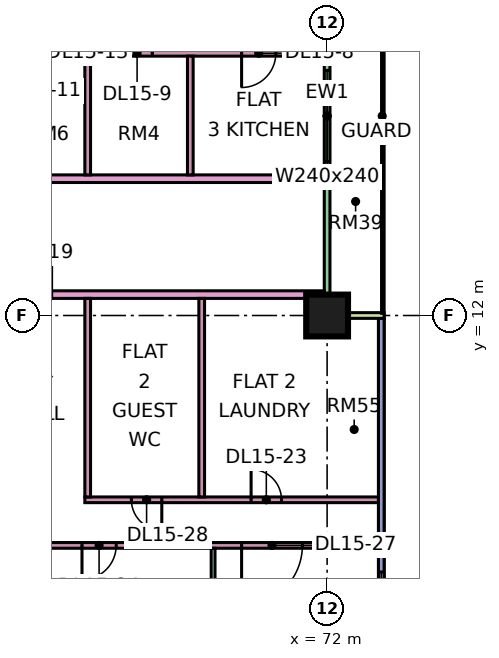
"""IFC4 building model, lengths in metres.
Left out: names, types, materials, properties, quantities, classifications, styles, units other than length and angle.
Written with IfcOpenShell. Run it as: python <this file> out.ifc"""

import sys

from ifc_helpers import new_model, si_unit, direction, frame, frame_2d, origin, origin_2d, place, context, subcontext, project, spatial, rectangle, extrude, element, fill, save


model = new_model("IFC4")
c1 = context("Model", 3, precision=1e-05, world=origin(), true_north=direction((0.0, 1.0)))
c2 = subcontext(c1, "Body", "Model", "MODEL_VIEW")
j1 = project(units=[si_unit("LENGTHUNIT", "METRE"), si_unit("PLANEANGLEUNIT", "RADIAN")], contexts=[c1])
p1 = place(None, origin())
s1 = spatial("IfcSite", under=j1, at=p1, CompositionType="ELEMENT")
p2 = place(p1, origin())
s2 = spatial("IfcBuilding", under=s1, at=p2, CompositionType="ELEMENT")
p3 = place(p2, frame((0.0, 0.0, 71.4)))
s3 = spatial("IfcBuildingStorey", under=s2, at=p3, CompositionType="ELEMENT", Elevation=71.4)
p4 = place(p3, frame((72.0, 12.0, 0.0), z_axis=(0.0, 0.0, 1.0), x_axis=(1.0, 0.0, 0.0)))
e1 = element("IfcColumn", 1, at=p4, inside=s3, PredefinedType="COLUMN", context=c2, shape_type="SweptSolid", body=[
    extrude(rectangle(XDim=1.1, YDim=1.1, at=origin_2d()), origin(), (0.0, 0.0, 1.0), 3.75),
])
p5 = place(p3, frame((73.425, 1.5, 0.0), z_axis=(0.0, 0.0, 1.0), x_axis=(0.0, 1.0, 0.0)))
e2 = element("IfcWall", 2, at=p5, inside=s3, PredefinedType="SOLIDWALL", context=c2, shape_type="SweptSolid", body=[
    extrude(rectangle(XDim=10.425, YDim=0.15, at=frame_2d((5.212, 0.0))), origin(), (0.0, 0.0, 1.0), 3.35),
])
p6 = place(p5, frame((0.75, 0.0, 0.45)))
e3 = element("IfcOpeningElement", 3, at=p6, cuts=e2, PredefinedType="OPENING", context=c2, shape_type="SweptSolid", body=[
    extrude(rectangle(XDim=3.0, YDim=2.4, at=frame_2d((1.5, 1.2))), frame((0.0, 0.085, 0.0), z_axis=(0.0, -1.0, 0.0), x_axis=(1.0, 0.0, 0.0)), (0.0, 0.0, 1.0), 0.17),
])
p7 = place(p3, frame((72.0, 12.075, 0.0), z_axis=(0.0, 0.0, 1.0), x_axis=(0.0, 1.0, 0.0)))
e4 = element("IfcWall", 4, at=p7, inside=s3, PredefinedType="SOLIDWALL", context=c2, shape_type="SweptSolid", body=[
    extrude(rectangle(XDim=10.35, YDim=0.15, at=frame_2d((5.175, 0.0))), origin(), (0.0, 0.0, 1.0), 3.35),
])
p8 = place(p7, frame((3.975, 0.0, 0.45)))
e5 = element("IfcOpeningElement", 5, at=p8, cuts=e4, PredefinedType="OPENING", context=c2, shape_type="SweptSolid", body=[
    extrude(rectangle(XDim=2.4, YDim=2.4, at=frame_2d((1.2, 1.2))), frame((0.0, 0.085, 0.0), z_axis=(0.0, -1.0, 0.0), x_axis=(1.0, 0.0, 0.0)), (0.0, 0.0, 1.0), 0.17),
])
p9 = place(p7, frame((8.587, 0.0, 0.45)))
e6 = element("IfcOpeningElement", 6, at=p9, cuts=e4, PredefinedType="OPENING", context=c2, shape_type="SweptSolid", body=[
    extrude(rectangle(XDim=1.2, YDim=2.4, at=frame_2d((0.6, 1.2))), frame((0.0, 0.085, 0.0), z_axis=(0.0, -1.0, 0.0), x_axis=(1.0, 0.0, 0.0)), (0.0, 0.0, 1.0), 0.17),
])
p10 = place(p3, frame((73.5, 12.0, 0.0), z_axis=(0.0, 0.0, 1.0), x_axis=(-1.0, 0.0, 0.0)))
e7 = element("IfcWall", 7, at=p10, inside=s3, PredefinedType="SOLIDWALL", context=c2, shape_type="SweptSolid", body=[
    extrude(rectangle(XDim=1.5, YDim=0.15, at=frame_2d((0.75, 0.0))), origin(), (0.0, 0.0, 1.0), 3.35),
])
p11 = place(p3, frame((40.65, 12.55, 0.0), z_axis=(0.0, 0.0, 1.0), x_axis=(1.0, 0.0, 0.0)))
e8 = element("IfcWall", 8, at=p11, inside=s3, PredefinedType="PARTITIONING", context=c2, shape_type="SweptSolid", body=[
    extrude(rectangle(XDim=31.276, YDim=0.2, at=frame_2d((15.638, 0.0))), origin(), (0.0, 0.0, 1.0), 3.35),
])
p12 = place(p11, frame((23.1, 0.0, 0.0)))
e9 = element("IfcOpeningElement", 9, at=p12, cuts=e8, PredefinedType="OPENING", context=c2, shape_type="SweptSolid", body=[
    extrude(rectangle(XDim=1.0, YDim=2.1, at=frame_2d((0.5, 1.05))), frame((0.0, 0.11, 0.0), z_axis=(0.0, -1.0, 0.0), x_axis=(1.0, 0.0, 0.0)), (0.0, 0.0, 1.0), 0.22),
])
p13 = place(p11, frame((1.05, 0.0, 0.0)))
e10 = element("IfcOpeningElement", 10, at=p13, cuts=e8, PredefinedType="OPENING", context=c2, shape_type="SweptSolid", body=[
    extrude(rectangle(XDim=1.0, YDim=2.1, at=frame_2d((0.5, 1.05))), frame((0.0, 0.11, 0.0), z_axis=(0.0, -1.0, 0.0), x_axis=(1.0, 0.0, 0.0)), (0.0, 0.0, 1.0), 0.22),
])
p14 = place(p3, frame((48.1, 5.95, 0.0), z_axis=(0.0, 0.0, 1.0), x_axis=(1.0, 0.0, 0.0)))
e11 = element("IfcWall", 11, at=p14, inside=s3, PredefinedType="PARTITIONING", context=c2, shape_type="SweptSolid", body=[
    extrude(rectangle(XDim=25.25, YDim=0.15, at=frame_2d((12.625, 0.0))), origin(), (0.0, 0.0, 1.0), 3.35),
])
p15 = place(p14, frame((0.95, 0.0, 0.0)))
e12 = element("IfcOpeningElement", 12, at=p15, cuts=e11, PredefinedType="OPENING", context=c2, shape_type="SweptSolid", body=[
    extrude(rectangle(XDim=0.9, YDim=2.1, at=frame_2d((0.45, 1.05))), frame((0.0, 0.085, 0.0), z_axis=(0.0, -1.0, 0.0), x_axis=(1.0, 0.0, 0.0)), (0.0, 0.0, 1.0), 0.17),
])
p16 = place(p14, frame((3.95, 0.0, 0.0)))
e13 = element("IfcOpeningElement", 13, at=p16, cuts=e11, PredefinedType="OPENING", context=c2, shape_type="SweptSolid", body=[
    extrude(rectangle(XDim=0.9, YDim=2.1, at=frame_2d((0.45, 1.05))), frame((0.0, 0.085, 0.0), z_axis=(0.0, -1.0, 0.0), x_axis=(1.0, 0.0, 0.0)), (0.0, 0.0, 1.0), 0.17),
])
p17 = place(p14, frame((6.95, 0.0, 0.0)))
e14 = element("IfcOpeningElement", 14, at=p17, cuts=e11, PredefinedType="OPENING", context=c2, shape_type="SweptSolid", body=[
    extrude(rectangle(XDim=0.9, YDim=2.1, at=frame_2d((0.45, 1.05))), frame((0.0, 0.085, 0.0), z_axis=(0.0, -1.0, 0.0), x_axis=(1.0, 0.0, 0.0)), (0.0, 0.0, 1.0), 0.17),
])
p18 = place(p14, frame((9.95, 0.0, 0.0)))
e15 = element("IfcOpeningElement", 15, at=p18, cuts=e11, PredefinedType="OPENING", context=c2, shape_type="SweptSolid", body=[
    extrude(rectangle(XDim=0.9, YDim=2.1, at=frame_2d((0.45, 1.05))), frame((0.0, 0.085, 0.0), z_axis=(0.0, -1.0, 0.0), x_axis=(1.0, 0.0, 0.0)), (0.0, 0.0, 1.0), 0.17),
])
p19 = place(p14, frame((17.45, 0.0, 0.0)))
e16 = element("IfcOpeningElement", 16, at=p19, cuts=e11, PredefinedType="OPENING", context=c2, shape_type="SweptSolid", body=[
    extrude(rectangle(XDim=0.9, YDim=2.1, at=frame_2d((0.45, 1.05))), frame((0.0, 0.085, 0.0), z_axis=(0.0, -1.0, 0.0), x_axis=(1.0, 0.0, 0.0)), (0.0, 0.0, 1.0), 0.17),
])
p20 = place(p14, frame((13.8, 0.0, 0.0)))
e17 = element("IfcOpeningElement", 17, at=p20, cuts=e11, PredefinedType="OPENING", context=c2, shape_type="SweptSolid", body=[
    extrude(rectangle(XDim=0.8, YDim=2.1, at=frame_2d((0.4, 1.05))), frame((0.0, 0.085, 0.0), z_axis=(0.0, -1.0, 0.0), x_axis=(1.0, 0.0, 0.0)), (0.0, 0.0, 1.0), 0.17),
])
p21 = place(p14, frame((21.65, 0.0, 0.0)))
e18 = element("IfcOpeningElement", 18, at=p21, cuts=e11, PredefinedType="OPENING", context=c2, shape_type="SweptSolid", body=[
    extrude(rectangle(XDim=1.6, YDim=2.1, at=frame_2d((0.8, 1.05))), frame((0.0, 0.085, 0.0), z_axis=(0.0, -1.0, 0.0), x_axis=(1.0, 0.0, 0.0)), (0.0, 0.0, 1.0), 0.17),
])
p22 = place(p3, frame((51.225, 15.6, 0.0), z_axis=(0.0, 0.0, 1.0), x_axis=(1.0, 0.0, 0.0)))
e19 = element("IfcWall", 19, at=p22, inside=s3, PredefinedType="PARTITIONING", context=c2, shape_type="SweptSolid", body=[
    extrude(rectangle(XDim=20.701, YDim=0.2, at=frame_2d((10.351, 0.0))), origin(), (0.0, 0.0, 1.0), 3.35),
])
p23 = place(p22, frame((3.725, 0.0, 0.0)))
e20 = element("IfcOpeningElement", 20, at=p23, cuts=e19, PredefinedType="OPENING", context=c2, shape_type="SweptSolid", body=[
    extrude(rectangle(XDim=1.0, YDim=2.1, at=frame_2d((0.5, 1.05))), frame((0.0, 0.11, 0.0), z_axis=(0.0, -1.0, 0.0), x_axis=(1.0, 0.0, 0.0)), (0.0, 0.0, 1.0), 0.22),
])
p24 = place(p22, frame((0.875, 0.0, 0.0)))
e21 = element("IfcOpeningElement", 21, at=p24, cuts=e19, PredefinedType="OPENING", context=c2, shape_type="SweptSolid", body=[
    extrude(rectangle(XDim=1.0, YDim=2.1, at=frame_2d((0.5, 1.05))), frame((0.0, 0.11, 0.0), z_axis=(0.0, -1.0, 0.0), x_axis=(1.0, 0.0, 0.0)), (0.0, 0.0, 1.0), 0.22),
])
p25 = place(p3, frame((56.925, 18.9, 0.0), z_axis=(0.0, 0.0, 1.0), x_axis=(1.0, 0.0, 0.0)))
e22 = element("IfcWall", 22, at=p25, inside=s3, PredefinedType="PARTITIONING", context=c2, shape_type="SweptSolid", body=[
    extrude(rectangle(XDim=15.001, YDim=0.15, at=frame_2d((7.5, 0.0))), origin(), (0.0, 0.0, 1.0), 3.35),
])
p26 = place(p25, frame((4.125, 0.0, 0.0)))
e23 = element("IfcOpeningElement", 23, at=p26, cuts=e22, PredefinedType="OPENING", context=c2, shape_type="SweptSolid", body=[
    extrude(rectangle(XDim=0.8, YDim=2.1, at=frame_2d((0.4, 1.05))), frame((0.0, 0.085, 0.0), z_axis=(0.0, -1.0, 0.0), x_axis=(1.0, 0.0, 0.0)), (0.0, 0.0, 1.0), 0.17),
])
p27 = place(p25, frame((12.825, 0.0, 0.0)))
e24 = element("IfcOpeningElement", 24, at=p27, cuts=e22, PredefinedType="OPENING", context=c2, shape_type="SweptSolid", body=[
    extrude(rectangle(XDim=0.9, YDim=2.1, at=frame_2d((0.45, 1.05))), frame((0.0, 0.085, 0.0), z_axis=(0.0, -1.0, 0.0), x_axis=(1.0, 0.0, 0.0)), (0.0, 0.0, 1.0), 0.17),
])
p28 = place(p25, frame((9.675, 0.0, 0.0)))
e25 = element("IfcOpeningElement", 25, at=p28, cuts=e22, PredefinedType="OPENING", context=c2, shape_type="SweptSolid", body=[
    extrude(rectangle(XDim=0.8, YDim=2.1, at=frame_2d((0.4, 1.05))), frame((0.0, 0.085, 0.0), z_axis=(0.0, -1.0, 0.0), x_axis=(1.0, 0.0, 0.0)), (0.0, 0.0, 1.0), 0.17),
])
p29 = place(p25, frame((0.825, 0.0, 0.0)))
e26 = element("IfcOpeningElement", 26, at=p29, cuts=e22, PredefinedType="OPENING", context=c2, shape_type="SweptSolid", body=[
    extrude(rectangle(XDim=0.8, YDim=2.1, at=frame_2d((0.4, 1.05))), frame((0.0, 0.085, 0.0), z_axis=(0.0, -1.0, 0.0), x_axis=(1.0, 0.0, 0.0)), (0.0, 0.0, 1.0), 0.17),
])
p30 = place(p25, frame((7.275, 0.0, 0.0)))
e27 = element("IfcOpeningElement", 27, at=p30, cuts=e22, PredefinedType="OPENING", context=c2, shape_type="SweptSolid", body=[
    extrude(rectangle(XDim=0.8, YDim=2.1, at=frame_2d((0.4, 1.05))), frame((0.0, 0.085, 0.0), z_axis=(0.0, -1.0, 0.0), x_axis=(1.0, 0.0, 0.0)), (0.0, 0.0, 1.0), 0.17),
])
p31 = place(p3, frame((65.625, 7.15, 0.0), z_axis=(0.0, 0.0, 1.0), x_axis=(1.0, 0.0, 0.0)))
e28 = element("IfcWall", 28, at=p31, inside=s3, PredefinedType="PARTITIONING", context=c2, shape_type="SweptSolid", body=[
    extrude(rectangle(XDim=7.725, YDim=0.15, at=frame_2d((3.863, 0.0))), origin(), (0.0, 0.0, 1.0), 3.35),
])
p32 = place(p31, frame((4.375, 0.0, 0.0)))
e29 = element("IfcOpeningElement", 29, at=p32, cuts=e28, PredefinedType="OPENING", context=c2, shape_type="SweptSolid", body=[
    extrude(rectangle(XDim=0.8, YDim=2.1, at=frame_2d((0.4, 1.05))), frame((0.0, 0.085, 0.0), z_axis=(0.0, -1.0, 0.0), x_axis=(1.0, 0.0, 0.0)), (0.0, 0.0, 1.0), 0.17),
])
p33 = place(p31, frame((1.225, 0.0, 0.0)))
e30 = element("IfcOpeningElement", 30, at=p33, cuts=e28, PredefinedType="OPENING", context=c2, shape_type="SweptSolid", body=[
    extrude(rectangle(XDim=0.8, YDim=2.1, at=frame_2d((0.4, 1.05))), frame((0.0, 0.085, 0.0), z_axis=(0.0, -1.0, 0.0), x_axis=(1.0, 0.0, 0.0)), (0.0, 0.0, 1.0), 0.17),
])
p34 = place(p3, frame((65.7, 7.225, 0.0), z_axis=(0.0, 0.0, 1.0), x_axis=(0.0, 1.0, 0.0)))
e31 = element("IfcWall", 31, at=p34, inside=s3, PredefinedType="PARTITIONING", context=c2, shape_type="SweptSolid", body=[
    extrude(rectangle(XDim=5.225, YDim=0.15, at=frame_2d((2.612, 0.0))), origin(), (0.0, 0.0, 1.0), 3.35),
])
for number, where, z_axis, x_axis in (
    (32, (65.7, 15.7, 0.0), (0.0, 0.0, 1.0), (0.0, 1.0, 0.0)),
    (33, (68.4, 15.7, 0.0), (0.0, 0.0, 1.0), (0.0, 1.0, 0.0)),
):
    element("IfcWall", number, at=place(p3, frame(where, z_axis=z_axis, x_axis=x_axis)), inside=s3, PredefinedType="PARTITIONING", context=c2, shape_type="SweptSolid", body=[
        extrude(rectangle(XDim=3.125, YDim=0.15, at=frame_2d((1.562, 0.0))), origin(), (0.0, 0.0, 1.0), 3.35),
    ])
p35 = place(p3, frame((68.7, 7.225, 0.0), z_axis=(0.0, 0.0, 1.0), x_axis=(0.0, 1.0, 0.0)))
e34 = element("IfcWall", 34, at=p35, inside=s3, PredefinedType="PARTITIONING", context=c2, shape_type="SweptSolid", body=[
    extrude(rectangle(XDim=5.225, YDim=0.15, at=frame_2d((2.612, 0.0))), origin(), (0.0, 0.0, 1.0), 3.35),
])
p36 = place(p3, frame((69.0, 0.074, 0.0), z_axis=(0.0, 0.0, 1.0), x_axis=(0.0, 1.0, 0.0)))
e35 = element("IfcWall", 35, at=p36, inside=s3, PredefinedType="PARTITIONING", context=c2, shape_type="SweptSolid", body=[
    extrude(rectangle(XDim=5.801, YDim=0.1, at=frame_2d((2.9, 0.0))), origin(), (0.0, 0.0, 1.0), 3.35),
])
p37 = place(p6, origin())
e36 = element("IfcWindow", 36, at=p37, inside=s3, PartitioningType="SINGLE_PANEL", PredefinedType="WINDOW", context=c2, shape_type="SweptSolid", body=[
    extrude(rectangle(XDim=3.0, YDim=2.4, at=frame_2d((1.5, 1.2))), frame((0.0, 0.03, 0.0), z_axis=(0.0, -1.0, 0.0), x_axis=(1.0, 0.0, 0.0)), (0.0, 0.0, 1.0), 0.06),
])
fill(e3, e36)
p38 = place(p8, origin())
e37 = element("IfcWindow", 37, at=p38, inside=s3, PartitioningType="SINGLE_PANEL", PredefinedType="WINDOW", context=c2, shape_type="SweptSolid", body=[
    extrude(rectangle(XDim=2.4, YDim=2.4, at=frame_2d((1.2, 1.2))), frame((0.0, 0.03, 0.0), z_axis=(0.0, -1.0, 0.0), x_axis=(1.0, 0.0, 0.0)), (0.0, 0.0, 1.0), 0.06),
])
fill(e5, e37)
p39 = place(p27, frame((0.9, 0.0, 0.0), z_axis=(0.0, 0.0, 1.0), x_axis=(-1.0, 0.0, 0.0)))
e38 = element("IfcDoor", 38, at=p39, inside=s3, OperationType="SINGLE_SWING_LEFT", PredefinedType="DOOR", context=c2, shape_type="SweptSolid", body=[
    extrude(rectangle(XDim=0.9, YDim=2.1, at=frame_2d((0.45, 1.05))), frame((0.0, 0.025, 0.0), z_axis=(0.0, -1.0, 0.0), x_axis=(1.0, 0.0, 0.0)), (0.0, 0.0, 1.0), 0.05),
])
fill(e24, e38)
p40 = place(p28, frame((0.8, 0.0, 0.0), z_axis=(0.0, 0.0, 1.0), x_axis=(-1.0, 0.0, 0.0)))
e39 = element("IfcDoor", 39, at=p40, inside=s3, OperationType="SINGLE_SWING_RIGHT", PredefinedType="DOOR", context=c2, shape_type="SweptSolid", body=[
    extrude(rectangle(XDim=0.8, YDim=2.1, at=frame_2d((0.4, 1.05))), frame((0.0, 0.025, 0.0), z_axis=(0.0, -1.0, 0.0), x_axis=(1.0, 0.0, 0.0)), (0.0, 0.0, 1.0), 0.05),
])
fill(e25, e39)
p41 = place(p30, frame((0.8, 0.0, 0.0), z_axis=(0.0, 0.0, 1.0), x_axis=(-1.0, 0.0, 0.0)))
e40 = element("IfcDoor", 40, at=p41, inside=s3, OperationType="SINGLE_SWING_RIGHT", PredefinedType="DOOR", context=c2, shape_type="SweptSolid", body=[
    extrude(rectangle(XDim=0.8, YDim=2.1, at=frame_2d((0.4, 1.05))), frame((0.0, 0.025, 0.0), z_axis=(0.0, -1.0, 0.0), x_axis=(1.0, 0.0, 0.0)), (0.0, 0.0, 1.0), 0.05),
])
fill(e27, e40)
p42 = place(p32, origin())
e41 = element("IfcDoor", 41, at=p42, inside=s3, OperationType="SINGLE_SWING_LEFT", PredefinedType="DOOR", context=c2, shape_type="SweptSolid", body=[
    extrude(rectangle(XDim=0.8, YDim=2.1, at=frame_2d((0.4, 1.05))), frame((0.0, 0.025, 0.0), z_axis=(0.0, -1.0, 0.0), x_axis=(1.0, 0.0, 0.0)), (0.0, 0.0, 1.0), 0.05),
])
fill(e29, e41)
p43 = place(p19, frame((0.9, 0.0, 0.0), z_axis=(0.0, 0.0, 1.0), x_axis=(-1.0, 0.0, 0.0)))
e42 = element("IfcDoor", 42, at=p43, inside=s3, OperationType="SINGLE_SWING_LEFT", PredefinedType="DOOR", context=c2, shape_type="SweptSolid", body=[
    extrude(rectangle(XDim=0.9, YDim=2.1, at=frame_2d((0.45, 1.05))), frame((0.0, 0.025, 0.0), z_axis=(0.0, -1.0, 0.0), x_axis=(1.0, 0.0, 0.0)), (0.0, 0.0, 1.0), 0.05),
])
fill(e16, e42)
p44 = place(p21, frame((1.6, 0.0, 0.0), z_axis=(0.0, 0.0, 1.0), x_axis=(-1.0, 0.0, 0.0)))
e43 = element("IfcDoor", 43, at=p44, inside=s3, OperationType="DOUBLE_DOOR_SINGLE_SWING", PredefinedType="DOOR", context=c2, shape_type="SweptSolid", body=[
    extrude(rectangle(XDim=1.6, YDim=2.1, at=frame_2d((0.8, 1.05))), frame((0.0, 0.025, 0.0), z_axis=(0.0, -1.0, 0.0), x_axis=(1.0, 0.0, 0.0)), (0.0, 0.0, 1.0), 0.05),
])
fill(e18, e43)
p45 = place(p33, origin())
e44 = element("IfcDoor", 44, at=p45, inside=s3, OperationType="SINGLE_SWING_RIGHT", PredefinedType="DOOR", context=c2, shape_type="SweptSolid", body=[
    extrude(rectangle(XDim=0.8, YDim=2.1, at=frame_2d((0.4, 1.05))), frame((0.0, 0.025, 0.0), z_axis=(0.0, -1.0, 0.0), x_axis=(1.0, 0.0, 0.0)), (0.0, 0.0, 1.0), 0.05),
])
fill(e30, e44)
save(model, sys.argv[1])
